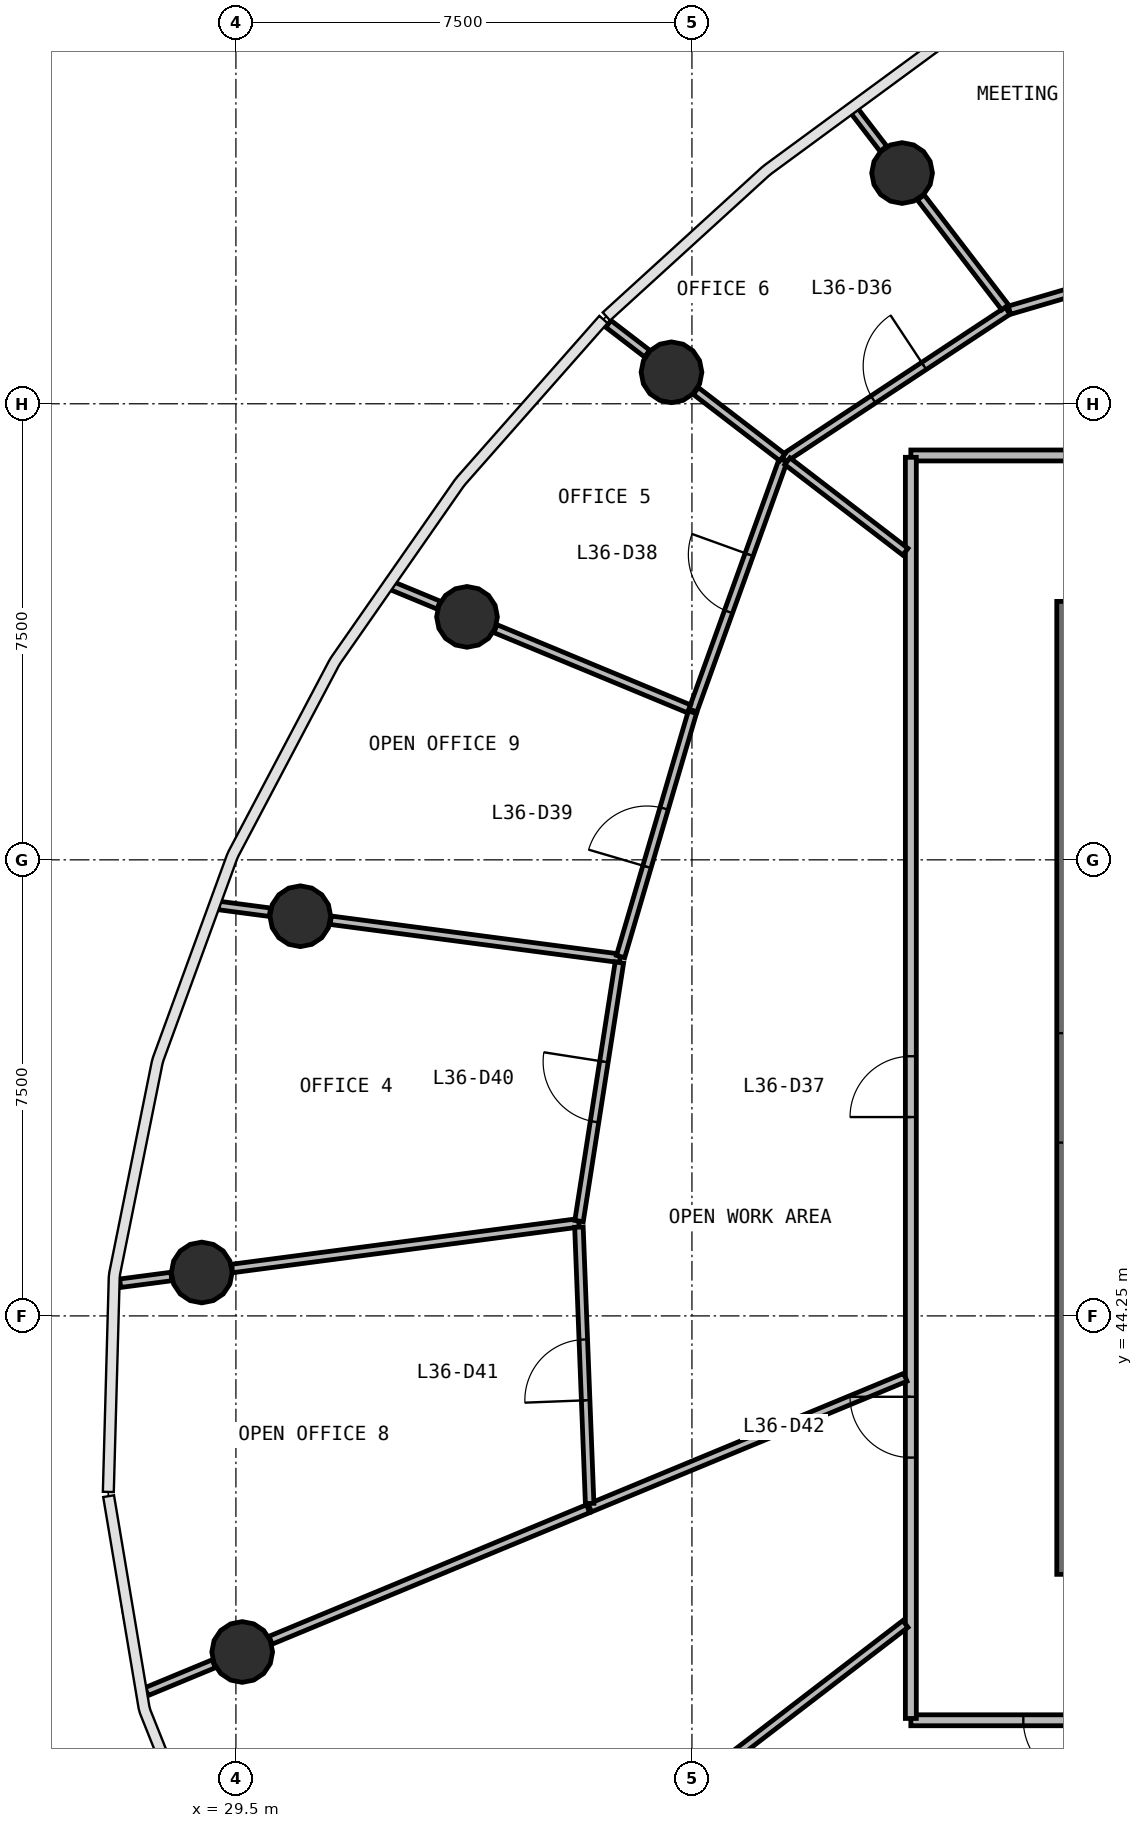
"""IFC4 building model, lengths in metres.
Left out: names, types, materials, properties, quantities, classifications, styles, units other than length and angle.
Written with IfcOpenShell. Run it as: python <this file> out.ifc"""

import sys

from ifc_helpers import new_model, si_unit, direction, frame, frame_2d, origin, origin_2d, place, context, subcontext, project, spatial, rectangle, circle, extrude, source, transform, mapped, element, fill, save


model = new_model("IFC4")
c1 = context("Model", 3, precision=1e-05, world=origin(), true_north=direction((0.0, 1.0)))
c2 = subcontext(c1, "Body", "Model", "MODEL_VIEW")
j1 = project(units=[si_unit("LENGTHUNIT", "METRE"), si_unit("PLANEANGLEUNIT", "RADIAN")], contexts=[c1])
p1 = place(None, origin())
s1 = spatial("IfcSite", under=j1, at=p1, CompositionType="ELEMENT")
p2 = place(p1, origin())
s2 = spatial("IfcBuilding", under=s1, at=p2, CompositionType="ELEMENT")
p3 = place(p2, frame((0.0, 0.0, 152.6)))
s3 = spatial("IfcBuildingStorey", under=s2, at=p3, CompositionType="ELEMENT", Elevation=152.6)
p4 = place(p3, frame((43.4, 56.0, 0.0), z_axis=(0.0, 0.0, 1.0), x_axis=(0.0, -1.0, 0.0)))
e1 = element("IfcWall", 1, at=p4, inside=s3, PredefinedType="SHEAR", context=c2, shape_type="SweptSolid", body=[
    extrude(rectangle(XDim=16.0, YDim=0.8, at=frame_2d((8.0, 0.0))), origin(), (0.0, 0.0, 1.0), 3.9),
])
p5 = place(p4, frame((7.1, 0.0, 0.0)))
e2 = element("IfcOpeningElement", 2, at=p5, cuts=e1, PredefinedType="OPENING", context=c2, shape_type="SweptSolid", body=[
    extrude(rectangle(XDim=1.8, YDim=2.1, at=frame_2d((0.9, 1.05))), frame((0.0, 0.41, 0.0), z_axis=(0.0, -1.0, 0.0), x_axis=(1.0, 0.0, 0.0)), (0.0, 0.0, 1.0), 0.82),
])
m1 = source(origin(), c2, "Body", "SweptSolid", [
    extrude(circle(Radius=0.5, at=origin_2d()), origin(), (0.0, 0.0, 1.0), 3.9),
])
for number, where, z_axis, x_axis in (
    (3, (40.456, 63.044, 0.0), (0.0, 0.0, 1.0), (1.0, 0.0, 0.0)),
    (4, (36.664, 59.768, 0.0), (0.0, 0.0, 1.0), (1.0, 0.0, 0.0)),
    (5, (33.301, 55.746, 0.0), (0.0, 0.0, 1.0), (1.0, 0.0, 0.0)),
    (6, (30.559, 50.823, 0.0), (0.0, 0.0, 1.0), (1.0, 0.0, 0.0)),
    (7, (28.938, 44.964, 0.0), (0.0, 0.0, 1.0), (1.0, 0.0, 0.0)),
    (8, (29.603, 38.723, 0.0), (0.0, 0.0, 1.0), (1.0, 0.0, 0.0)),
):
    element("IfcColumn", number, at=place(p3, frame(where, z_axis=z_axis, x_axis=x_axis)), inside=s3, PredefinedType="COLUMN", context=c2, shape_type="MappedRepresentation", body=[
        mapped(m1, transform((0.0, 0.0, 0.0), scale=1.0)),
    ])
p6 = place(p3, frame((40.6, 58.4, 0.0), z_axis=(0.0, 0.0, 1.0), x_axis=(1.0, 0.0, 0.0)))
e9 = element("IfcWall", 9, at=p6, inside=s3, PredefinedType="PARTITIONING", context=c2, shape_type="SweptSolid", body=[
    extrude(rectangle(XDim=22.8, YDim=0.18, at=frame_2d((11.4, 0.0))), origin(), (0.0, 0.0, 1.0), 2.88),
])
p7 = place(p6, frame((12.95, 0.0, 0.0)))
e10 = element("IfcOpeningElement", 10, at=p7, cuts=e9, PredefinedType="OPENING", context=c2, shape_type="SweptSolid", body=[
    extrude(rectangle(XDim=1.0, YDim=2.1, at=frame_2d((0.5, 1.05))), frame((0.0, 0.1, 0.0), z_axis=(0.0, -1.0, 0.0), x_axis=(1.0, 0.0, 0.0)), (0.0, 0.0, 1.0), 0.2),
])
p8 = place(p6, frame((10.95, 0.0, 0.0)))
e11 = element("IfcOpeningElement", 11, at=p8, cuts=e9, PredefinedType="OPENING", context=c2, shape_type="SweptSolid", body=[
    extrude(rectangle(XDim=1.0, YDim=2.1, at=frame_2d((0.5, 1.05))), frame((0.0, 0.1, 0.0), z_axis=(0.0, -1.0, 0.0), x_axis=(1.0, 0.0, 0.0)), (0.0, 0.0, 1.0), 0.2),
])
p9 = place(p3, frame((63.4, 37.6, 0.0), z_axis=(0.0, 0.0, 1.0), x_axis=(-1.0, 0.0, 0.0)))
e12 = element("IfcWall", 12, at=p9, inside=s3, PredefinedType="PARTITIONING", context=c2, shape_type="SweptSolid", body=[
    extrude(rectangle(XDim=22.8, YDim=0.18, at=frame_2d((11.4, 0.0))), origin(), (0.0, 0.0, 1.0), 2.88),
])
p10 = place(p9, frame((16.05, 0.0, 0.0)))
e13 = element("IfcOpeningElement", 13, at=p10, cuts=e12, PredefinedType="OPENING", context=c2, shape_type="SweptSolid", body=[
    extrude(rectangle(XDim=0.9, YDim=2.1, at=frame_2d((0.45, 1.05))), frame((0.0, 0.1, 0.0), z_axis=(0.0, -1.0, 0.0), x_axis=(1.0, 0.0, 0.0)), (0.0, 0.0, 1.0), 0.2),
])
p11 = place(p9, frame((13.05, 0.0, 0.0)))
e14 = element("IfcOpeningElement", 14, at=p11, cuts=e12, PredefinedType="OPENING", context=c2, shape_type="SweptSolid", body=[
    extrude(rectangle(XDim=0.9, YDim=2.1, at=frame_2d((0.45, 1.05))), frame((0.0, 0.1, 0.0), z_axis=(0.0, -1.0, 0.0), x_axis=(1.0, 0.0, 0.0)), (0.0, 0.0, 1.0), 0.2),
])
p12 = place(p9, frame((10.95, 0.0, 0.0)))
e15 = element("IfcOpeningElement", 15, at=p12, cuts=e12, PredefinedType="OPENING", context=c2, shape_type="SweptSolid", body=[
    extrude(rectangle(XDim=1.0, YDim=2.1, at=frame_2d((0.5, 1.05))), frame((0.0, 0.1, 0.0), z_axis=(0.0, -1.0, 0.0), x_axis=(1.0, 0.0, 0.0)), (0.0, 0.0, 1.0), 0.2),
])
p13 = place(p9, frame((19.95, 0.0, 0.0)))
e16 = element("IfcOpeningElement", 16, at=p13, cuts=e12, PredefinedType="OPENING", context=c2, shape_type="SweptSolid", body=[
    extrude(rectangle(XDim=1.0, YDim=2.1, at=frame_2d((0.5, 1.05))), frame((0.0, 0.1, 0.0), z_axis=(0.0, -1.0, 0.0), x_axis=(1.0, 0.0, 0.0)), (0.0, 0.0, 1.0), 0.2),
])
p14 = place(p3, frame((40.6, 37.63, 0.0), z_axis=(0.0, 0.0, 1.0), x_axis=(0.0, 1.0, 0.0)))
e17 = element("IfcWall", 17, at=p14, inside=s3, PredefinedType="PARTITIONING", context=c2, shape_type="SweptSolid", body=[
    extrude(rectangle(XDim=20.74, YDim=0.18, at=frame_2d((10.37, 0.0))), origin(), (0.0, 0.0, 1.0), 2.88),
])
p15 = place(p14, frame((9.89, 0.0, 0.0)))
e18 = element("IfcOpeningElement", 18, at=p15, cuts=e17, PredefinedType="OPENING", context=c2, shape_type="SweptSolid", body=[
    extrude(rectangle(XDim=1.0, YDim=2.1, at=frame_2d((0.5, 1.05))), frame((0.0, 0.1, 0.0), z_axis=(0.0, -1.0, 0.0), x_axis=(1.0, 0.0, 0.0)), (0.0, 0.0, 1.0), 0.2),
])
p16 = place(p14, frame((4.29, 0.0, 0.0)))
e19 = element("IfcOpeningElement", 19, at=p16, cuts=e17, PredefinedType="OPENING", context=c2, shape_type="SweptSolid", body=[
    extrude(rectangle(XDim=1.0, YDim=2.1, at=frame_2d((0.5, 1.05))), frame((0.0, 0.1, 0.0), z_axis=(0.0, -1.0, 0.0), x_axis=(1.0, 0.0, 0.0)), (0.0, 0.0, 1.0), 0.2),
])
p17 = place(p3, frame((35.139, 45.78, 0.0), z_axis=(0.0, 0.0, 1.0), x_axis=(-0.99144533292, -0.130522610424, 0.0)))
e20 = element("IfcWall", 20, at=p17, inside=s3, PredefinedType="PARTITIONING", context=c2, shape_type="SweptSolid", body=[
    extrude(rectangle(XDim=5.75, YDim=0.14, at=frame_2d((2.875, 0.0))), origin(), (0.0, 0.0, 1.0), 2.88),
])
p18 = place(p3, frame((40.51, 43.241, 0.0), z_axis=(0.0, 0.0, 1.0), x_axis=(-0.92387220975, -0.382701110597, 0.0)))
e21 = element("IfcWall", 21, at=p18, inside=s3, PredefinedType="PARTITIONING", context=c2, shape_type="SweptSolid", body=[
    extrude(rectangle(XDim=5.617, YDim=0.14, at=frame_2d((2.809, 0.0))), origin(), (0.0, 0.0, 1.0), 2.88),
])
p19 = place(p3, frame((35.293, 41.08, 0.0), z_axis=(0.0, 0.0, 1.0), x_axis=(-0.923883666289, -0.38267345239, 0.0)))
e22 = element("IfcWall", 22, at=p19, inside=s3, PredefinedType="PARTITIONING", context=c2, shape_type="SweptSolid", body=[
    extrude(rectangle(XDim=5.653, YDim=0.14, at=frame_2d((2.827, 0.0))), origin(), (0.0, 0.0, 1.0), 2.88),
])
p20 = place(p3, frame((40.51, 39.183, 0.0), z_axis=(0.0, 0.0, 1.0), x_axis=(-0.793354275357, -0.608760210405, 0.0)))
e23 = element("IfcWall", 23, at=p20, inside=s3, PredefinedType="PARTITIONING", context=c2, shape_type="SweptSolid", body=[
    extrude(rectangle(XDim=4.88, YDim=0.14, at=frame_2d((2.44, 0.0))), origin(), (0.0, 0.0, 1.0), 2.88),
])
p21 = place(p3, frame((35.817, 50.131, 0.0), z_axis=(0.0, 0.0, 1.0), x_axis=(-0.991450832312, 0.13048083042, 0.0)))
e24 = element("IfcWall", 24, at=p21, inside=s3, PredefinedType="PARTITIONING", context=c2, shape_type="SweptSolid", body=[
    extrude(rectangle(XDim=4.799, YDim=0.14, at=frame_2d((2.4, 0.0))), origin(), (0.0, 0.0, 1.0), 2.88),
])
p22 = place(p3, frame((35.318, 41.166, 0.0), z_axis=(0.0, 0.0, 1.0), x_axis=(-0.038760942668, 0.999248512295, 0.0)))
e25 = element("IfcWall", 25, at=p22, inside=s3, PredefinedType="PARTITIONING", context=c2, shape_type="SweptSolid", body=[
    extrude(rectangle(XDim=4.548, YDim=0.14, at=frame_2d((2.274, 0.0))), origin(), (0.0, 0.0, 1.0), 2.88),
])
p23 = place(p22, frame((1.698, 0.0, 0.0)))
e26 = element("IfcOpeningElement", 26, at=p23, cuts=e25, PredefinedType="OPENING", context=c2, shape_type="SweptSolid", body=[
    extrude(rectangle(XDim=1.0, YDim=2.1, at=frame_2d((0.5, 1.05))), frame((0.0, 0.08, 0.0), z_axis=(0.0, -1.0, 0.0), x_axis=(1.0, 0.0, 0.0)), (0.0, 0.0, 1.0), 0.16),
])
p24 = place(p3, frame((38.511, 58.351, 0.0), z_axis=(0.0, 0.0, 1.0), x_axis=(0.834612459485, 0.550837582662, 0.0)))
e27 = element("IfcWall", 27, at=p24, inside=s3, PredefinedType="PARTITIONING", context=c2, shape_type="SweptSolid", body=[
    extrude(rectangle(XDim=4.412, YDim=0.14, at=frame_2d((2.206, 0.0))), origin(), (0.0, 0.0, 1.0), 2.88),
])
p25 = place(p24, frame((1.762, 0.0, 0.0)))
e28 = element("IfcOpeningElement", 28, at=p25, cuts=e27, PredefinedType="OPENING", context=c2, shape_type="SweptSolid", body=[
    extrude(rectangle(XDim=1.0, YDim=2.1, at=frame_2d((0.5, 1.05))), frame((0.0, 0.08, 0.0), z_axis=(0.0, -1.0, 0.0), x_axis=(1.0, 0.0, 0.0)), (0.0, 0.0, 1.0), 0.16),
])
p26 = place(p3, frame((37.016, 54.207, 0.0), z_axis=(0.0, 0.0, 1.0), x_axis=(0.339349662801, 0.940660303381, 0.0)))
e29 = element("IfcWall", 29, at=p26, inside=s3, PredefinedType="PARTITIONING", context=c2, shape_type="SweptSolid", body=[
    extrude(rectangle(XDim=4.376, YDim=0.14, at=frame_2d((2.188, 0.0))), origin(), (0.0, 0.0, 1.0), 2.88),
])
p27 = place(p26, frame((1.725, 0.0, 0.0)))
e30 = element("IfcOpeningElement", 30, at=p27, cuts=e29, PredefinedType="OPENING", context=c2, shape_type="SweptSolid", body=[
    extrude(rectangle(XDim=1.0, YDim=2.1, at=frame_2d((0.5, 1.05))), frame((0.0, 0.08, 0.0), z_axis=(0.0, -1.0, 0.0), x_axis=(1.0, 0.0, 0.0)), (0.0, 0.0, 1.0), 0.16),
])
p28 = place(p3, frame((35.143, 45.81, 0.0), z_axis=(0.0, 0.0, 1.0), x_axis=(0.154158792567, 0.988046085299, 0.0)))
e31 = element("IfcWall", 31, at=p28, inside=s3, PredefinedType="PARTITIONING", context=c2, shape_type="SweptSolid", body=[
    extrude(rectangle(XDim=4.303, YDim=0.14, at=frame_2d((2.151, 0.0))), origin(), (0.0, 0.0, 1.0), 2.88),
])
p29 = place(p28, frame((1.653, 0.0, 0.0)))
e32 = element("IfcOpeningElement", 32, at=p29, cuts=e31, PredefinedType="OPENING", context=c2, shape_type="SweptSolid", body=[
    extrude(rectangle(XDim=1.0, YDim=2.1, at=frame_2d((0.5, 1.05))), frame((0.0, 0.08, 0.0), z_axis=(0.0, -1.0, 0.0), x_axis=(1.0, 0.0, 0.0)), (0.0, 0.0, 1.0), 0.16),
])
p30 = place(p3, frame((35.826, 50.159, 0.0), z_axis=(0.0, 0.0, 1.0), x_axis=(0.28208743745, 0.959388699971, 0.0)))
e33 = element("IfcWall", 33, at=p30, inside=s3, PredefinedType="PARTITIONING", context=c2, shape_type="SweptSolid", body=[
    extrude(rectangle(XDim=4.189, YDim=0.14, at=frame_2d((2.094, 0.0))), origin(), (0.0, 0.0, 1.0), 2.88),
])
p31 = place(p30, frame((1.539, 0.0, 0.0)))
e34 = element("IfcOpeningElement", 34, at=p31, cuts=e33, PredefinedType="OPENING", context=c2, shape_type="SweptSolid", body=[
    extrude(rectangle(XDim=1.0, YDim=2.1, at=frame_2d((0.5, 1.05))), frame((0.0, 0.08, 0.0), z_axis=(0.0, -1.0, 0.0), x_axis=(1.0, 0.0, 0.0)), (0.0, 0.0, 1.0), 0.16),
])
p32 = place(p3, frame((42.222, 60.789, 0.0), z_axis=(0.0, 0.0, 1.0), x_axis=(0.959559478974, 0.281505961415, 0.0)))
e35 = element("IfcWall", 35, at=p32, inside=s3, PredefinedType="PARTITIONING", context=c2, shape_type="SweptSolid", body=[
    extrude(rectangle(XDim=4.164, YDim=0.14, at=frame_2d((2.082, 0.0))), origin(), (0.0, 0.0, 1.0), 2.88),
])
p33 = place(p32, frame((1.514, 0.0, 0.0)))
e36 = element("IfcOpeningElement", 36, at=p33, cuts=e35, PredefinedType="OPENING", context=c2, shape_type="SweptSolid", body=[
    extrude(rectangle(XDim=1.0, YDim=2.1, at=frame_2d((0.5, 1.05))), frame((0.0, 0.08, 0.0), z_axis=(0.0, -1.0, 0.0), x_axis=(1.0, 0.0, 0.0)), (0.0, 0.0, 1.0), 0.16),
])
p34 = place(p3, frame((36.951, 54.233, 0.0), z_axis=(0.0, 0.0, 1.0), x_axis=(-0.923873497733, 0.382698001285, 0.0)))
e37 = element("IfcWall", 37, at=p34, inside=s3, PredefinedType="PARTITIONING", context=c2, shape_type="SweptSolid", body=[
    extrude(rectangle(XDim=3.446, YDim=0.14, at=frame_2d((1.723, 0.0))), origin(), (0.0, 0.0, 1.0), 2.88),
])
p35 = place(p3, frame((43.951, 37.51, 0.0), z_axis=(0.0, 0.0, 1.0), x_axis=(-0.608758797461, -0.793355359542, 0.0)))
e38 = element("IfcWall", 38, at=p35, inside=s3, PredefinedType="PARTITIONING", context=c2, shape_type="SweptSolid", body=[
    extrude(rectangle(XDim=3.038, YDim=0.14, at=frame_2d((1.519, 0.0))), origin(), (0.0, 0.0, 1.0), 2.88),
])
p36 = place(p3, frame((40.51, 56.817, 0.0), z_axis=(0.0, 0.0, 1.0), x_axis=(-0.793387804713, 0.608716511467, 0.0)))
e39 = element("IfcWall", 39, at=p36, inside=s3, PredefinedType="PARTITIONING", context=c2, shape_type="SweptSolid", body=[
    extrude(rectangle(XDim=2.446, YDim=0.14, at=frame_2d((1.223, 0.0))), origin(), (0.0, 0.0, 1.0), 2.88),
])
p37 = place(p3, frame((42.15, 60.836, 0.0), z_axis=(0.0, 0.0, 1.0), x_axis=(-0.608757629388, 0.793356255828, 0.0)))
e40 = element("IfcWall", 40, at=p37, inside=s3, PredefinedType="PARTITIONING", context=c2, shape_type="SweptSolid", body=[
    extrude(rectangle(XDim=2.279, YDim=0.14, at=frame_2d((1.139, 0.0))), origin(), (0.0, 0.0, 1.0), 2.88),
])
p38 = place(p3, frame((38.487, 58.369, 0.0), z_axis=(0.0, 0.0, 1.0), x_axis=(-0.793336842099, 0.608782929269, 0.0)))
e41 = element("IfcWall", 41, at=p38, inside=s3, PredefinedType="PARTITIONING", context=c2, shape_type="SweptSolid", body=[
    extrude(rectangle(XDim=1.794, YDim=0.14, at=frame_2d((0.897, 0.0))), origin(), (0.0, 0.0, 1.0), 2.88),
])
p39 = place(p3, frame((29.137, 38.53, 0.0), z_axis=(0.0, 0.0, 1.0), x_axis=(-0.923882723383, -0.382675728829, 0.0)))
e42 = element("IfcWall", 42, at=p39, inside=s3, PredefinedType="PARTITIONING", context=c2, shape_type="SweptSolid", body=[
    extrude(rectangle(XDim=1.198, YDim=0.14, at=frame_2d((0.599, 0.0))), origin(), (0.0, 0.0, 1.0), 2.88),
])
p40 = place(p3, frame((30.059, 50.889, 0.0), z_axis=(0.0, 0.0, 1.0), x_axis=(-0.991446500326, 0.130513742537, 0.0)))
e43 = element("IfcWall", 43, at=p40, inside=s3, PredefinedType="PARTITIONING", context=c2, shape_type="SweptSolid", body=[
    extrude(rectangle(XDim=0.853, YDim=0.14, at=frame_2d((0.427, 0.0))), origin(), (0.0, 0.0, 1.0), 2.88),
])
p41 = place(p3, frame((28.438, 44.898, 0.0), z_axis=(0.0, 0.0, 1.0), x_axis=(-0.991432738393, -0.130618242377, 0.0)))
e44 = element("IfcWall", 44, at=p41, inside=s3, PredefinedType="PARTITIONING", context=c2, shape_type="SweptSolid", body=[
    extrude(rectangle(XDim=0.849, YDim=0.14, at=frame_2d((0.424, 0.0))), origin(), (0.0, 0.0, 1.0), 2.88),
])
p42 = place(p3, frame((32.834, 55.939, 0.0), z_axis=(0.0, 0.0, 1.0), x_axis=(-0.923909393783, 0.382611332921, 0.0)))
e45 = element("IfcWall", 45, at=p42, inside=s3, PredefinedType="PARTITIONING", context=c2, shape_type="SweptSolid", body=[
    extrude(rectangle(XDim=0.831, YDim=0.14, at=frame_2d((0.416, 0.0))), origin(), (0.0, 0.0, 1.0), 2.88),
])
p43 = place(p3, frame((36.263, 60.075, 0.0), z_axis=(0.0, 0.0, 1.0), x_axis=(-0.793425360376, 0.608667559109, 0.0)))
e46 = element("IfcWall", 46, at=p43, inside=s3, PredefinedType="PARTITIONING", context=c2, shape_type="SweptSolid", body=[
    extrude(rectangle(XDim=0.803, YDim=0.14, at=frame_2d((0.402, 0.0))), origin(), (0.0, 0.0, 1.0), 2.88),
])
p44 = place(p3, frame((40.149, 63.445, 0.0), z_axis=(0.0, 0.0, 1.0), x_axis=(-0.608659697441, 0.793431391307, 0.0)))
e47 = element("IfcWall", 47, at=p44, inside=s3, PredefinedType="PARTITIONING", context=c2, shape_type="SweptSolid", body=[
    extrude(rectangle(XDim=0.786, YDim=0.14, at=frame_2d((0.393, 0.0))), origin(), (0.0, 0.0, 1.0), 2.88),
])
m2 = source(origin(), c2, "Body", "SweptSolid", [
    extrude(rectangle(XDim=1.0, YDim=2.1, at=frame_2d((0.5, 1.05))), frame((0.0, 0.025, 0.0), z_axis=(0.0, -1.0, 0.0), x_axis=(1.0, 0.0, 0.0)), (0.0, 0.0, 1.0), 0.05),
])
p45 = place(p25, origin())
e48 = element("IfcDoor", 48, at=p45, inside=s3, OperationType="SINGLE_SWING_RIGHT", PredefinedType="DOOR", context=c2, shape_type="MappedRepresentation", body=[
    mapped(m2, transform((0.0, 0.0, 0.0), scale=1.0)),
])
fill(e28, e48)
p46 = place(p15, origin())
e49 = element("IfcDoor", 49, at=p46, inside=s3, OperationType="SINGLE_SWING_LEFT", PredefinedType="DOOR", context=c2, shape_type="MappedRepresentation", body=[
    mapped(m2, transform((0.0, 0.0, 0.0), scale=1.0)),
])
fill(e18, e49)
p47 = place(p27, origin())
e50 = element("IfcDoor", 50, at=p47, inside=s3, OperationType="SINGLE_SWING_RIGHT", PredefinedType="DOOR", context=c2, shape_type="MappedRepresentation", body=[
    mapped(m2, transform((0.0, 0.0, 0.0), scale=1.0)),
])
fill(e30, e50)
p48 = place(p31, origin())
e51 = element("IfcDoor", 51, at=p48, inside=s3, OperationType="SINGLE_SWING_LEFT", PredefinedType="DOOR", context=c2, shape_type="MappedRepresentation", body=[
    mapped(m2, transform((0.0, 0.0, 0.0), scale=1.0)),
])
fill(e34, e51)
p49 = place(p29, origin())
e52 = element("IfcDoor", 52, at=p49, inside=s3, OperationType="SINGLE_SWING_RIGHT", PredefinedType="DOOR", context=c2, shape_type="MappedRepresentation", body=[
    mapped(m2, transform((0.0, 0.0, 0.0), scale=1.0)),
])
fill(e32, e52)
p50 = place(p23, origin())
e53 = element("IfcDoor", 53, at=p50, inside=s3, OperationType="SINGLE_SWING_LEFT", PredefinedType="DOOR", context=c2, shape_type="MappedRepresentation", body=[
    mapped(m2, transform((0.0, 0.0, 0.0), scale=1.0)),
])
fill(e26, e53)
p51 = place(p16, origin())
e54 = element("IfcDoor", 54, at=p51, inside=s3, OperationType="SINGLE_SWING_RIGHT", PredefinedType="DOOR", context=c2, shape_type="MappedRepresentation", body=[
    mapped(m2, transform((0.0, 0.0, 0.0), scale=1.0)),
])
fill(e19, e54)
p52 = place(p13, origin())
e55 = element("IfcDoor", 55, at=p52, inside=s3, OperationType="SINGLE_SWING_LEFT", PredefinedType="DOOR", context=c2, shape_type="MappedRepresentation", body=[
    mapped(m2, transform((0.0, 0.0, 0.0), scale=1.0)),
])
fill(e16, e55)
save(model, sys.argv[1])
